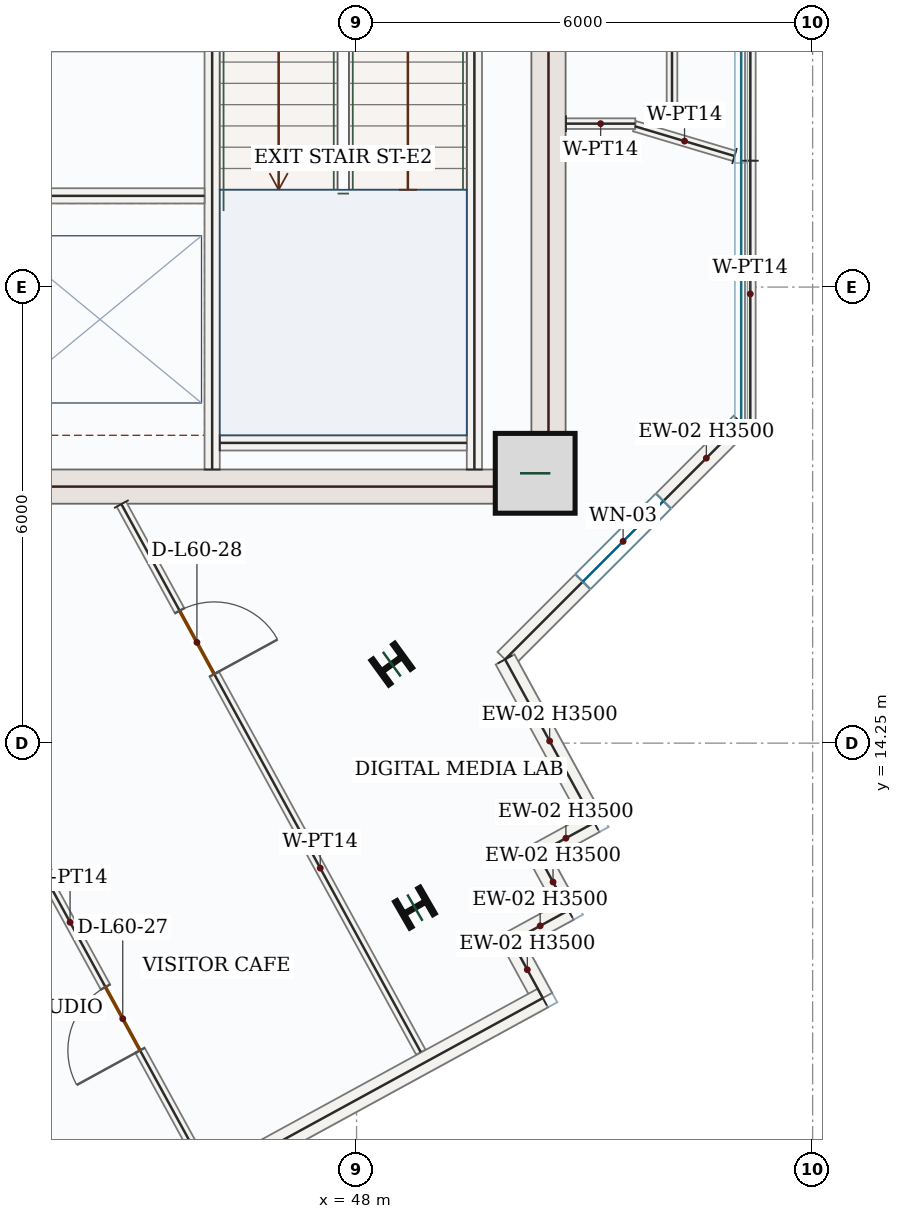
"""IFC4 building model, lengths in metres.
Left out: names, types, materials, properties, quantities, classifications, styles, units other than length and angle.
Written with IfcOpenShell. Run it as: python <this file> out.ifc"""

import sys

from ifc_helpers import new_model, si_unit, direction, frame, frame_2d, origin, origin_2d, place, context, subcontext, project, spatial, rectangle, i_section, extrude, source, transform, mapped, element, fill, save


model = new_model("IFC4")
c1 = context("Model", 3, precision=1e-05, world=origin(), true_north=direction((0.0, 1.0)))
c2 = subcontext(c1, "Body", "Model", "MODEL_VIEW")
j1 = project(units=[si_unit("LENGTHUNIT", "METRE"), si_unit("PLANEANGLEUNIT", "RADIAN")], contexts=[c1])
p1 = place(None, origin())
s1 = spatial("IfcSite", under=j1, at=p1, CompositionType="ELEMENT")
p2 = place(p1, origin())
s2 = spatial("IfcBuilding", under=s1, at=p2, CompositionType="ELEMENT")
p3 = place(p2, frame((0.0, 0.0, 254.1)))
s3 = spatial("IfcBuildingStorey", under=s2, at=p3, CompositionType="ELEMENT", Elevation=254.1)
m1 = source(origin(), c2, "Body", "SweptSolid", [
    extrude(rectangle(XDim=8.55, YDim=0.45, at=frame_2d((4.275, 0.0))), origin(), (0.0, 0.0, 1.0), 3.5),
])
p4 = place(p3, frame((50.525, 17.4, 0.0), z_axis=(0.0, 0.0, 1.0), x_axis=(0.0, 1.0, 0.0)))
e1 = element("IfcWall", 1, at=p4, inside=s3, PredefinedType="SHEAR", context=c2, shape_type="MappedRepresentation", body=[
    mapped(m1, transform((0.0, 0.0, 0.0), x_axis=(1.0, 0.0, 0.0), y_axis=(0.0, 1.0, 0.0), z_axis=(0.0, 0.0, 1.0), scale=1.0)),
])
m2 = source(origin(), c2, "Body", "SweptSolid", [
    extrude(rectangle(XDim=7.1, YDim=0.45, at=frame_2d((3.55, 0.0))), origin(), (0.0, 0.0, 1.0), 3.5),
])
p5 = place(p3, frame((43.2, 17.625, 0.0), z_axis=(0.0, 0.0, 1.0), x_axis=(1.0, 0.0, 0.0)))
e2 = element("IfcWall", 2, at=p5, inside=s3, PredefinedType="SHEAR", context=c2, shape_type="MappedRepresentation", body=[
    mapped(m2, transform((0.0, 0.0, 0.0), x_axis=(1.0, 0.0, 0.0), y_axis=(0.0, 1.0, 0.0), z_axis=(0.0, 0.0, 1.0), scale=1.0)),
])
m3 = source(origin(), c2, "Body", "SweptSolid", [
    extrude(rectangle(XDim=1.05, YDim=1.05, at=origin_2d()), origin(), (0.0, 0.0, 1.0), 3.75),
])
p6 = place(p3, frame((50.35, 17.8, 0.0), z_axis=(0.0, 0.0, 1.0), x_axis=(1.0, 0.0, 0.0)))
e3 = element("IfcColumn", 3, at=p6, inside=s3, PredefinedType="COLUMN", context=c2, shape_type="MappedRepresentation", body=[
    mapped(m3, transform((0.0, 0.0, 0.0), x_axis=(1.0, 0.0, 0.0), y_axis=(0.0, 1.0, 0.0), z_axis=(0.0, 0.0, 1.0), scale=1.0)),
])
m4 = source(origin(), c2, "Body", "SweptSolid", [
    extrude(i_section(OverallWidth=0.399, OverallDepth=0.386, WebThickness=0.021, FlangeThickness=0.033, FilletRadius=0.018, at=origin_2d()), origin(), (0.0, 0.0, 1.0), 3.75),
])
for number, where, z_axis, x_axis in (
    (4, (48.464, 15.289, 0.0), (0.0, 0.0, 1.0), (-0.588, 0.809, 0.0)),
    (5, (48.768, 12.086, 0.0), (0.0, 0.0, 1.0), (-0.5, 0.866, 0.0)),
):
    element("IfcColumn", number, at=place(p3, frame(where, z_axis=z_axis, x_axis=x_axis)), inside=s3, PredefinedType="COLUMN", context=c2, shape_type="MappedRepresentation", body=[
        mapped(m4, transform((0.0, 0.0, 0.0), x_axis=(1.0, 0.0, 0.0), y_axis=(0.0, 1.0, 0.0), z_axis=(0.0, 0.0, 1.0), scale=1.0)),
    ])
p7 = place(p3, frame((53.06, 18.458, 0.0), z_axis=(0.0, 0.0, 1.0), x_axis=(-0.707106781187, -0.707106781187, 0.0)))
e6 = element("IfcWall", 6, at=p7, inside=s3, PredefinedType="SOLIDWALL", context=c2, shape_type="SweptSolid", body=[
    extrude(rectangle(XDim=4.394, YDim=0.28, at=frame_2d((2.197, 0.0))), origin(), (0.0, 0.0, 1.0), 3.5),
])
p8 = place(p7, frame((1.447, 0.0, 0.85)))
e7 = element("IfcOpeningElement", 7, at=p8, cuts=e6, PredefinedType="OPENING", context=c2, shape_type="SweptSolid", body=[
    extrude(rectangle(XDim=1.5, YDim=1.5, at=frame_2d((0.75, 0.75))), frame((0.0, 0.15, 0.0), z_axis=(0.0, -1.0, 0.0), x_axis=(1.0, 0.0, 0.0)), (0.0, 0.0, 1.0), 0.3),
])
m5 = source(origin(), c2, "Body", "SweptSolid", [
    extrude(rectangle(XDim=2.448, YDim=0.28, at=frame_2d((1.224, 0.0))), origin(), (0.0, 0.0, 1.0), 3.5),
])
p9 = place(p3, frame((49.953, 15.351, 0.0), z_axis=(0.0, 0.0, 1.0), x_axis=(0.47951595933, -0.877533158774, 0.0)))
e8 = element("IfcWall", 8, at=p9, inside=s3, PredefinedType="SOLIDWALL", context=c2, shape_type="MappedRepresentation", body=[
    mapped(m5, transform((0.0, 0.0, 0.0), x_axis=(1.0, 0.0, 0.0), y_axis=(0.0, 1.0, 0.0), z_axis=(0.0, 0.0, 1.0), scale=1.0)),
])
m6 = source(origin(), c2, "Body", "SweptSolid", [
    extrude(rectangle(XDim=0.85, YDim=0.28, at=frame_2d((0.425, 0.0))), origin(), (0.0, 0.0, 1.0), 3.5),
])
p10 = place(p3, frame((51.127, 13.204, 0.0), z_axis=(0.0, 0.0, 1.0), x_axis=(-0.87752219781, -0.479536017782, 0.0)))
e9 = element("IfcWall", 9, at=p10, inside=s3, PredefinedType="SOLIDWALL", context=c2, shape_type="MappedRepresentation", body=[
    mapped(m6, transform((0.0, 0.0, 0.0), x_axis=(1.0, 0.0, 0.0), y_axis=(0.0, 1.0, 0.0), z_axis=(0.0, 0.0, 1.0), scale=1.0)),
])
m7 = source(origin(), c2, "Body", "SweptSolid", [
    extrude(rectangle(XDim=0.85, YDim=0.28, at=frame_2d((0.425, 0.0))), origin(), (0.0, 0.0, 1.0), 3.5),
])
for number, where, z_axis, x_axis in (
    (10, (50.381, 12.796, 0.0), (0.0, 0.0, 1.0), (0.48, -0.877, 0.0)),
    (11, (50.789, 12.05, 0.0), (0.0, 0.0, 1.0), (-0.878, -0.479, 0.0)),
):
    element("IfcWall", number, at=place(p3, frame(where, z_axis=z_axis, x_axis=x_axis)), inside=s3, PredefinedType="SOLIDWALL", context=c2, shape_type="MappedRepresentation", body=[
        mapped(m7, transform((0.0, 0.0, 0.0), x_axis=(1.0, 0.0, 0.0), y_axis=(0.0, 1.0, 0.0), z_axis=(0.0, 0.0, 1.0), scale=1.0)),
    ])
p11 = place(p3, frame((50.042, 11.643, 0.0), z_axis=(0.0, 0.0, 1.0), x_axis=(0.479536017782, -0.87752219781, 0.0)))
e12 = element("IfcWall", 12, at=p11, inside=s3, PredefinedType="SOLIDWALL", context=c2, shape_type="MappedRepresentation", body=[
    mapped(m6, transform((0.0, 0.0, 0.0), x_axis=(1.0, 0.0, 0.0), y_axis=(0.0, 1.0, 0.0), z_axis=(0.0, 0.0, 1.0), scale=1.0)),
])
m8 = source(origin(), c2, "Body", "SweptSolid", [
    extrude(rectangle(XDim=9.92, YDim=0.28, at=frame_2d((4.96, 0.0))), origin(), (0.0, 0.0, 1.0), 3.5),
])
p12 = place(p3, frame((50.45, 10.896, 0.0), z_axis=(0.0, 0.0, 1.0), x_axis=(-0.877572768104, -0.479443465574, 0.0)))
e13 = element("IfcWall", 13, at=p12, inside=s3, PredefinedType="SOLIDWALL", context=c2, shape_type="MappedRepresentation", body=[
    mapped(m8, transform((0.0, 0.0, 0.0), x_axis=(1.0, 0.0, 0.0), y_axis=(0.0, 1.0, 0.0), z_axis=(0.0, 0.0, 1.0), scale=1.0)),
])
m9 = source(origin(), c2, "Body", "SweptSolid", [
    extrude(rectangle(XDim=7.87, YDim=0.2, at=frame_2d((3.935, 0.0))), origin(), (0.0, 0.0, 1.0), 3.5),
])
p13 = place(p3, frame((49.55, 17.85, 0.0), z_axis=(0.0, 0.0, 1.0), x_axis=(0.0, 1.0, 0.0)))
e14 = element("IfcWall", 14, at=p13, inside=s3, PredefinedType="SOLIDWALL", context=c2, shape_type="MappedRepresentation", body=[
    mapped(m9, transform((0.0, 0.0, 0.0), x_axis=(1.0, 0.0, 0.0), y_axis=(0.0, 1.0, 0.0), z_axis=(0.0, 0.0, 1.0), scale=1.0)),
])
p14 = place(p3, frame((46.1, 17.85, 0.0), z_axis=(0.0, 0.0, 1.0), x_axis=(0.0, 1.0, 0.0)))
e15 = element("IfcWall", 15, at=p14, inside=s3, PredefinedType="SOLIDWALL", context=c2, shape_type="SweptSolid", body=[
    extrude(rectangle(XDim=8.0, YDim=0.2, at=frame_2d((4.0, 0.0))), origin(), (0.0, 0.0, 1.0), 3.5),
])
p15 = place(p14, frame((6.3, 0.0, 0.0)))
e16 = element("IfcOpeningElement", 16, at=p15, cuts=e15, PredefinedType="OPENING", context=c2, shape_type="SweptSolid", body=[
    extrude(rectangle(XDim=1.05, YDim=2.15, at=frame_2d((0.525, 1.075))), frame((0.0, 0.11, 0.0), z_axis=(0.0, -1.0, 0.0), x_axis=(1.0, 0.0, 0.0)), (0.0, 0.0, 1.0), 0.22),
])
m10 = source(origin(), c2, "Body", "SweptSolid", [
    extrude(rectangle(XDim=3.25, YDim=0.2, at=frame_2d((1.625, 0.0))), origin(), (0.0, 0.0, 1.0), 3.5),
])
p16 = place(p3, frame((46.2, 18.2, 0.0), z_axis=(0.0, 0.0, 1.0), x_axis=(1.0, 0.0, 0.0)))
e17 = element("IfcWall", 17, at=p16, inside=s3, PredefinedType="SOLIDWALL", context=c2, shape_type="MappedRepresentation", body=[
    mapped(m10, transform((0.0, 0.0, 0.0), x_axis=(1.0, 0.0, 0.0), y_axis=(0.0, 1.0, 0.0), z_axis=(0.0, 0.0, 1.0), scale=1.0)),
])
m11 = source(origin(), c2, "Body", "SweptSolid", [
    extrude(rectangle(XDim=2.75, YDim=0.2, at=frame_2d((1.375, 0.0))), origin(), (0.0, 0.0, 1.0), 3.5),
])
p17 = place(p3, frame((43.25, 21.45, 0.0), z_axis=(0.0, 0.0, 1.0), x_axis=(1.0, 0.0, 0.0)))
e18 = element("IfcWall", 18, at=p17, inside=s3, PredefinedType="SOLIDWALL", context=c2, shape_type="MappedRepresentation", body=[
    mapped(m11, transform((0.0, 0.0, 0.0), x_axis=(1.0, 0.0, 0.0), y_axis=(0.0, 1.0, 0.0), z_axis=(0.0, 0.0, 1.0), scale=1.0)),
])
p18 = place(p3, frame((44.906, 17.395, 0.0), z_axis=(0.0, 0.0, 1.0), x_axis=(0.479449534835, -0.877569452264, 0.0)))
e19 = element("IfcWall", 19, at=p18, inside=s3, PredefinedType="PARTITIONING", context=c2, shape_type="SweptSolid", body=[
    extrude(rectangle(XDim=8.216, YDim=0.14, at=frame_2d((4.108, 0.0))), origin(), (0.0, 0.0, 1.0), 3.5),
])
p19 = place(p18, frame((1.599, 0.0, 0.0)))
e20 = element("IfcOpeningElement", 20, at=p19, cuts=e19, PredefinedType="OPENING", context=c2, shape_type="SweptSolid", body=[
    extrude(rectangle(XDim=0.95, YDim=2.15, at=frame_2d((0.475, 1.075))), frame((0.0, 0.08, 0.0), z_axis=(0.0, -1.0, 0.0), x_axis=(1.0, 0.0, 0.0)), (0.0, 0.0, 1.0), 0.16),
])
p20 = place(p3, frame((46.01, 8.636, 0.0), z_axis=(0.0, 0.0, 1.0), x_axis=(-0.479410597023, 0.877590724348, 0.0)))
e21 = element("IfcWall", 21, at=p20, inside=s3, PredefinedType="PARTITIONING", context=c2, shape_type="SweptSolid", body=[
    extrude(rectangle(XDim=4.532, YDim=0.14, at=frame_2d((2.266, 0.0))), origin(), (0.0, 0.0, 1.0), 3.5),
])
p21 = place(p20, frame((1.791, 0.0, 0.0)))
e22 = element("IfcOpeningElement", 22, at=p21, cuts=e21, PredefinedType="OPENING", context=c2, shape_type="SweptSolid", body=[
    extrude(rectangle(XDim=0.95, YDim=2.15, at=frame_2d((0.475, 1.075))), frame((0.0, 0.08, 0.0), z_axis=(0.0, -1.0, 0.0), x_axis=(1.0, 0.0, 0.0)), (0.0, 0.0, 1.0), 0.16),
])
p22 = place(p3, frame((52.15, 22.406, 0.0), z_axis=(0.0, 0.0, 1.0), x_axis=(-2.657666e-05, 0.999999999647, 0.0)))
e23 = element("IfcWall", 23, at=p22, inside=s3, PredefinedType="PARTITIONING", context=c2, shape_type="SweptSolid", body=[
    extrude(rectangle(XDim=9.186, YDim=0.14, at=frame_2d((4.593, 0.0))), origin(), (0.0, 0.0, 1.0), 3.5),
])
p23 = place(p22, frame((2.883, 0.0, 0.0)))
e24 = element("IfcOpeningElement", 24, at=p23, cuts=e23, PredefinedType="OPENING", context=c2, shape_type="SweptSolid", body=[
    extrude(rectangle(XDim=0.95, YDim=2.15, at=frame_2d((0.475, 1.075))), frame((0.0, 0.08, 0.0), z_axis=(0.0, -1.0, 0.0), x_axis=(1.0, 0.0, 0.0)), (0.0, 0.0, 1.0), 0.16),
])
m12 = source(origin(), c2, "Body", "SweptSolid", [
    extrude(rectangle(XDim=6.722, YDim=0.14, at=frame_2d((3.361, 0.0))), origin(), (0.0, 0.0, 1.0), 3.5),
])
p24 = place(p3, frame((53.184, 28.634, 0.0), z_axis=(0.0, 0.0, 1.0), x_axis=(-0.000544820492, -0.999999851585, 0.0)))
e25 = element("IfcWall", 25, at=p24, inside=s3, PredefinedType="PARTITIONING", context=c2, shape_type="MappedRepresentation", body=[
    mapped(m12, transform((0.0, 0.0, 0.0), x_axis=(1.0, 0.0, 0.0), y_axis=(0.0, 1.0, 0.0), z_axis=(0.0, 0.0, 1.0), scale=1.0)),
])
m13 = source(origin(), c2, "Body", "SweptSolid", [
    extrude(rectangle(XDim=1.373, YDim=0.14, at=frame_2d((0.687, 0.0))), origin(), (0.0, 0.0, 1.0), 3.5),
])
p25 = place(p3, frame((52.972, 21.974, 0.0), z_axis=(0.0, 0.0, 1.0), x_axis=(-0.958236472503, 0.285977031883, 0.0)))
e26 = element("IfcWall", 26, at=p25, inside=s3, PredefinedType="PARTITIONING", context=c2, shape_type="MappedRepresentation", body=[
    mapped(m13, transform((0.0, 0.0, 0.0), x_axis=(1.0, 0.0, 0.0), y_axis=(0.0, 1.0, 0.0), z_axis=(0.0, 0.0, 1.0), scale=1.0)),
])
m14 = source(origin(), c2, "Body", "SweptSolid", [
    extrude(rectangle(XDim=0.912, YDim=0.14, at=frame_2d((0.456, 0.0))), origin(), (0.0, 0.0, 1.0), 3.5),
])
p26 = place(p3, frame((50.755, 22.4, 0.0), z_axis=(0.0, 0.0, 1.0), x_axis=(1.0, 0.0, 0.0)))
e27 = element("IfcWall", 27, at=p26, inside=s3, PredefinedType="PARTITIONING", context=c2, shape_type="MappedRepresentation", body=[
    mapped(m14, transform((0.0, 0.0, 0.0), x_axis=(1.0, 0.0, 0.0), y_axis=(0.0, 1.0, 0.0), z_axis=(0.0, 0.0, 1.0), scale=1.0)),
])
m15 = source(origin(), c2, "Body", "SweptSolid", [
    extrude(rectangle(XDim=3.504, YDim=0.14, at=frame_2d((1.752, 0.0))), origin(), (0.0, 0.0, 1.0), 3.5),
])
p27 = place(p3, frame((53.18, 21.912, 0.0), z_axis=(0.0, 0.0, 1.0), x_axis=(0.0, -1.0, 0.0)))
e28 = element("IfcWall", 28, at=p27, inside=s3, PredefinedType="PARTITIONING", context=c2, shape_type="MappedRepresentation", body=[
    mapped(m15, transform((0.0, 0.0, 0.0), x_axis=(1.0, 0.0, 0.0), y_axis=(0.0, 1.0, 0.0), z_axis=(0.0, 0.0, 1.0), scale=1.0)),
])
m16 = source(origin(), c2, "Body", "SweptSolid", [
    extrude(rectangle(XDim=1.5, YDim=1.5, at=frame_2d((0.75, 0.75))), frame((0.0, 0.03, 0.0), z_axis=(0.0, -1.0, 0.0), x_axis=(1.0, 0.0, 0.0)), (0.0, 0.0, 1.0), 0.06),
])
p28 = place(p8, origin())
e29 = element("IfcWindow", 29, at=p28, inside=s3, PartitioningType="SINGLE_PANEL", PredefinedType="WINDOW", context=c2, shape_type="MappedRepresentation", body=[
    mapped(m16, transform((0.0, 0.0, 0.0), x_axis=(1.0, 0.0, 0.0), y_axis=(0.0, 1.0, 0.0), z_axis=(0.0, 0.0, 1.0), scale=1.0)),
])
fill(e7, e29)
m17 = source(origin(), c2, "Body", "SweptSolid", [
    extrude(rectangle(XDim=0.95, YDim=2.15, at=frame_2d((0.475, 1.075))), frame((0.0, 0.025, 0.0), z_axis=(0.0, -1.0, 0.0), x_axis=(1.0, 0.0, 0.0)), (0.0, 0.0, 1.0), 0.05),
])
p29 = place(p21, origin())
e30 = element("IfcDoor", 30, at=p29, inside=s3, OperationType="SINGLE_SWING_LEFT", PredefinedType="DOOR", context=c2, shape_type="MappedRepresentation", body=[
    mapped(m17, transform((0.0, 0.0, 0.0), x_axis=(1.0, 0.0, 0.0), y_axis=(0.0, 1.0, 0.0), z_axis=(0.0, 0.0, 1.0), scale=1.0)),
])
fill(e22, e30)
p30 = place(p19, origin())
e31 = element("IfcDoor", 31, at=p30, inside=s3, OperationType="SINGLE_SWING_RIGHT", PredefinedType="DOOR", context=c2, shape_type="MappedRepresentation", body=[
    mapped(m17, transform((0.0, 0.0, 0.0), x_axis=(1.0, 0.0, 0.0), y_axis=(0.0, 1.0, 0.0), z_axis=(0.0, 0.0, 1.0), scale=1.0)),
])
fill(e20, e31)
save(model, sys.argv[1])
